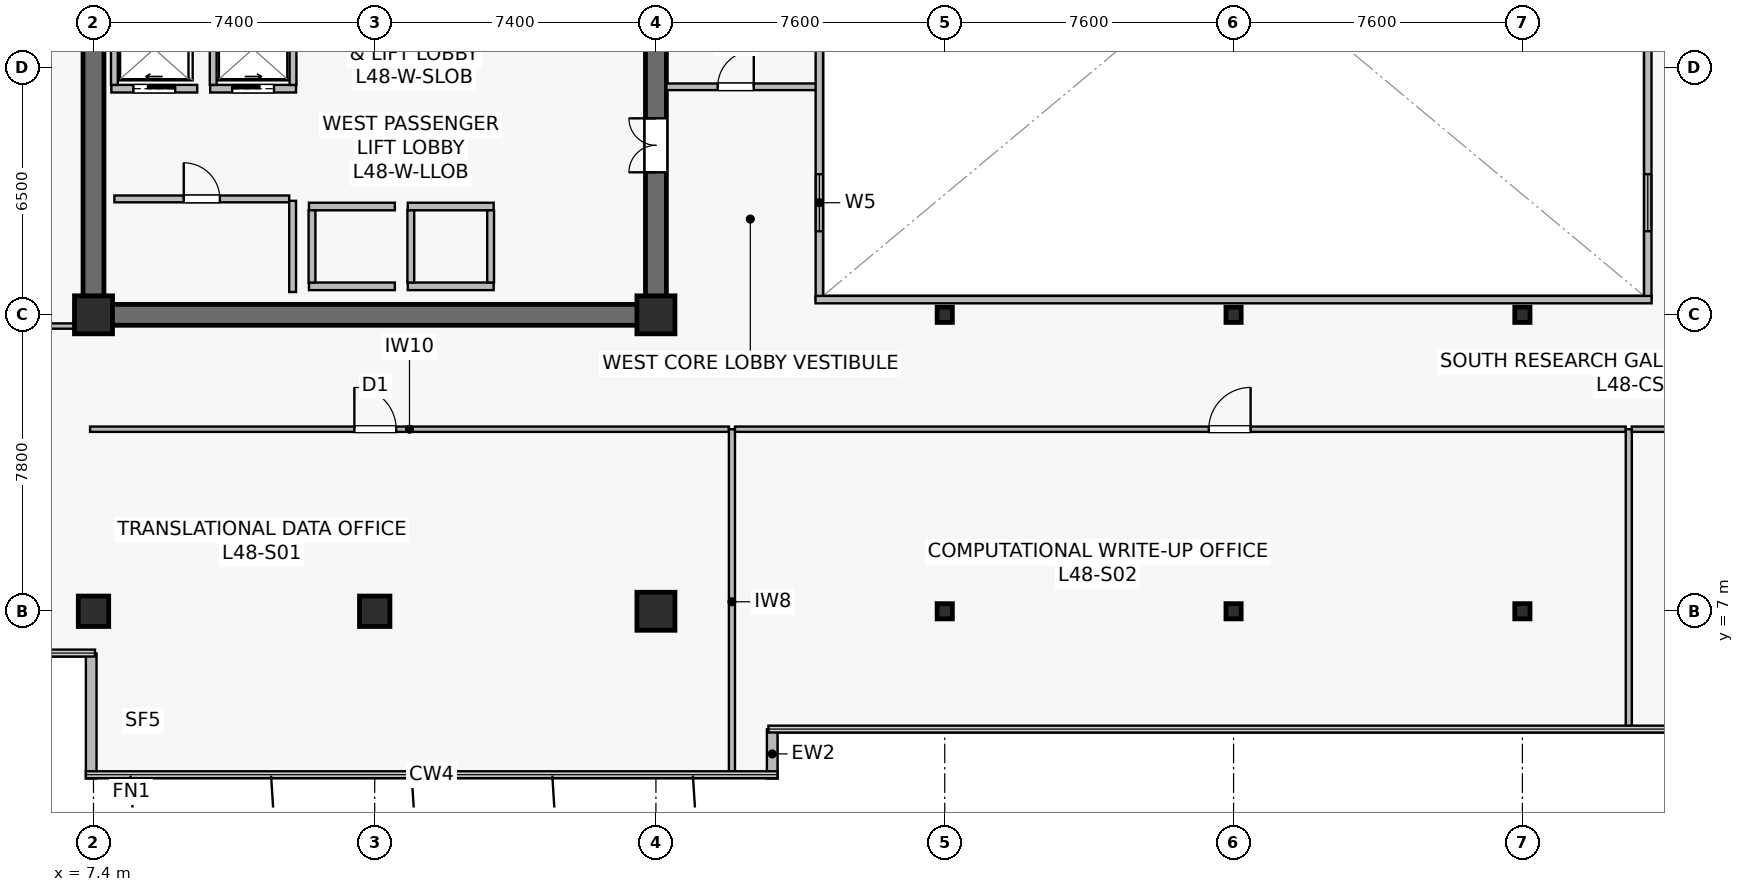
"""IFC4 building model, lengths in metres.
Left out: names, types, materials, properties, quantities, classifications, styles, units other than length and angle.
Written with IfcOpenShell. Run it as: python <this file> out.ifc"""

import sys

from ifc_helpers import new_model, si_unit, direction, frame, frame_2d, origin, origin_2d, place, context, subcontext, project, spatial, rectangle, hollow_rectangle, extrude, source, transform, mapped, element, fill, save


model = new_model("IFC4")
c1 = context("Model", 3, precision=1e-05, world=origin(), true_north=direction((0.0, 1.0)))
c2 = subcontext(c1, "Body", "Model", "MODEL_VIEW")
j1 = project(units=[si_unit("LENGTHUNIT", "METRE"), si_unit("PLANEANGLEUNIT", "RADIAN")], contexts=[c1])
p1 = place(None, origin())
s1 = spatial("IfcSite", under=j1, at=p1, CompositionType="ELEMENT")
p2 = place(p1, origin())
s2 = spatial("IfcBuilding", under=s1, at=p2, CompositionType="ELEMENT")
p3 = place(p2, frame((0.0, 0.0, 201.4)))
s3 = spatial("IfcBuildingStorey", under=s2, at=p3, CompositionType="ELEMENT", Elevation=201.4)
p4 = place(p3, frame((7.125, 14.8, 0.0), z_axis=(0.0, 0.0, 1.0), x_axis=(1.0, 0.0, 0.0)))
e1 = element("IfcWall", 1, at=p4, inside=s3, PredefinedType="SHEAR", context=c2, shape_type="SweptSolid", body=[
    extrude(rectangle(XDim=15.35, YDim=0.55, at=frame_2d((7.675, 0.0))), origin(), (0.0, 0.0, 1.0), 3.8),
])
p5 = place(p3, frame((7.4, 15.075, 0.0), z_axis=(0.0, 0.0, 1.0), x_axis=(0.0, 1.0, 0.0)))
e2 = element("IfcWall", 2, at=p5, inside=s3, PredefinedType="SHEAR", context=c2, shape_type="SweptSolid", body=[
    extrude(rectangle(XDim=18.45, YDim=0.55, at=frame_2d((9.225, 0.0))), origin(), (0.0, 0.0, 1.0), 3.8),
])
p6 = place(p3, frame((22.2, 15.075, 0.0), z_axis=(0.0, 0.0, 1.0), x_axis=(0.0, 1.0, 0.0)))
e3 = element("IfcWall", 3, at=p6, inside=s3, PredefinedType="SHEAR", context=c2, shape_type="SweptSolid", body=[
    extrude(rectangle(XDim=18.45, YDim=0.55, at=frame_2d((9.225, 0.0))), origin(), (0.0, 0.0, 1.0), 3.8),
])
p7 = place(p6, frame((3.475, 0.0, 0.0)))
e4 = element("IfcOpeningElement", 4, at=p7, cuts=e3, PredefinedType="OPENING", context=c2, shape_type="SweptSolid", body=[
    extrude(rectangle(XDim=1.42, YDim=2.2, at=frame_2d((0.71, 1.1))), frame((0.0, 0.285, 0.0), z_axis=(0.0, -1.0, 0.0), x_axis=(1.0, 0.0, 0.0)), (0.0, 0.0, 1.0), 0.57),
])
m1 = source(origin(), c2, "Body", "SweptSolid", [
    extrude(rectangle(XDim=0.8, YDim=0.8, at=origin_2d()), origin(), (0.0, 0.0, 1.0), 4.1),
])
p8 = place(p3, frame((14.8, 7.0, 0.0), z_axis=(0.0, 0.0, 1.0), x_axis=(1.0, 0.0, 0.0)))
e5 = element("IfcColumn", 5, at=p8, inside=s3, PredefinedType="COLUMN", context=c2, shape_type="MappedRepresentation", body=[
    mapped(m1, transform((0.0, 0.0, 0.0), scale=1.0)),
])
m2 = source(origin(), c2, "Body", "SweptSolid", [
    extrude(rectangle(XDim=1.0, YDim=1.0, at=origin_2d()), origin(), (0.0, 0.0, 1.0), 4.1),
])
for number, where, z_axis, x_axis in (
    (6, (22.2, 7.0, 0.0), (0.0, 0.0, 1.0), (1.0, 0.0, 0.0)),
    (7, (7.4, 14.8, 0.0), (0.0, 0.0, 1.0), (1.0, 0.0, 0.0)),
    (8, (22.2, 14.8, 0.0), (0.0, 0.0, 1.0), (1.0, 0.0, 0.0)),
):
    element("IfcColumn", number, at=place(p3, frame(where, z_axis=z_axis, x_axis=x_axis)), inside=s3, PredefinedType="COLUMN", context=c2, shape_type="MappedRepresentation", body=[
        mapped(m2, transform((0.0, 0.0, 0.0), scale=1.0)),
    ])
p9 = place(p3, frame((7.4, 7.0, 0.0), z_axis=(0.0, 0.0, 1.0), x_axis=(1.0, 0.0, 0.0)))
e9 = element("IfcColumn", 9, at=p9, inside=s3, PredefinedType="COLUMN", context=c2, shape_type="MappedRepresentation", body=[
    mapped(m1, transform((0.0, 0.0, 0.0), scale=1.0)),
])
m3 = source(origin(), c2, "Body", "SweptSolid", [
    extrude(hollow_rectangle(XDim=0.4, YDim=0.4, WallThickness=0.019, at=origin_2d()), origin(), (0.0, 0.0, 1.0), 4.1),
])
for number, where, z_axis, x_axis in (
    (10, (29.8, 7.0, 0.0), (0.0, 0.0, 1.0), (1.0, 0.0, 0.0)),
    (11, (29.8, 14.8, 0.0), (0.0, 0.0, 1.0), (1.0, 0.0, 0.0)),
    (12, (37.4, 7.0, 0.0), (0.0, 0.0, 1.0), (1.0, 0.0, 0.0)),
    (13, (37.4, 14.8, 0.0), (0.0, 0.0, 1.0), (1.0, 0.0, 0.0)),
    (14, (45.0, 7.0, 0.0), (0.0, 0.0, 1.0), (1.0, 0.0, 0.0)),
    (15, (45.0, 14.8, 0.0), (0.0, 0.0, 1.0), (1.0, 0.0, 0.0)),
):
    element("IfcColumn", number, at=place(p3, frame(where, z_axis=z_axis, x_axis=x_axis)), inside=s3, PredefinedType="COLUMN", context=c2, shape_type="MappedRepresentation", body=[
        mapped(m3, transform((0.0, 0.0, 0.0), scale=1.0)),
    ])
p10 = place(p3, frame((25.26, 2.6, 0.0), z_axis=(0.0, 0.0, 1.0), x_axis=(0.0, 1.0, 0.0)))
e16 = element("IfcWall", 16, at=p10, inside=s3, PredefinedType="STANDARD", context=c2, shape_type="SweptSolid", body=[
    extrude(rectangle(XDim=1.293, YDim=0.28, at=frame_2d((0.646, 0.0))), origin(), (0.0, 0.0, 1.0), 3.8),
])
p11 = place(p3, frame((7.34, 5.888, 0.0), z_axis=(0.0, 0.0, 1.0), x_axis=(0.0, -1.0, 0.0)))
e17 = element("IfcWall", 17, at=p11, inside=s3, PredefinedType="STANDARD", context=c2, shape_type="SweptSolid", body=[
    extrude(rectangle(XDim=3.288, YDim=0.28, at=frame_2d((1.644, 0.0))), origin(), (0.0, 0.0, 1.0), 3.8),
])
for number, where, z_axis, x_axis in (
    (18, (13.07, 17.65, 0.0), (0.0, 0.0, 1.0), (1.0, 0.0, 0.0)),
    (19, (13.07, 15.55, 0.0), (0.0, 0.0, 1.0), (1.0, 0.0, 0.0)),
):
    element("IfcWall", number, at=place(p3, frame(where, z_axis=z_axis, x_axis=x_axis)), inside=s3, PredefinedType="SOLIDWALL", context=c2, shape_type="SweptSolid", body=[
        extrude(rectangle(XDim=2.26, YDim=0.2, at=frame_2d((1.13, 0.0))), origin(), (0.0, 0.0, 1.0), 3.197),
    ])
p12 = place(p3, frame((13.15, 15.65, 0.0), z_axis=(0.0, 0.0, 1.0), x_axis=(0.0, 1.0, 0.0)))
e20 = element("IfcWall", 20, at=p12, inside=s3, PredefinedType="SOLIDWALL", context=c2, shape_type="SweptSolid", body=[
    extrude(rectangle(XDim=1.9, YDim=0.18, at=frame_2d((0.95, 0.0))), origin(), (0.0, 0.0, 1.0), 3.8),
])
for number, where, z_axis, x_axis in (
    (21, (15.67, 17.65, 0.0), (0.0, 0.0, 1.0), (1.0, 0.0, 0.0)),
    (22, (15.67, 15.55, 0.0), (0.0, 0.0, 1.0), (1.0, 0.0, 0.0)),
):
    element("IfcWall", number, at=place(p3, frame(where, z_axis=z_axis, x_axis=x_axis)), inside=s3, PredefinedType="SOLIDWALL", context=c2, shape_type="SweptSolid", body=[
        extrude(rectangle(XDim=2.26, YDim=0.2, at=frame_2d((1.13, 0.0))), origin(), (0.0, 0.0, 1.0), 3.8),
    ])
for number, where, z_axis, x_axis in (
    (23, (15.75, 15.65, 0.0), (0.0, 0.0, 1.0), (0.0, 1.0, 0.0)),
    (24, (17.85, 15.65, 0.0), (0.0, 0.0, 1.0), (0.0, 1.0, 0.0)),
):
    element("IfcWall", number, at=place(p3, frame(where, z_axis=z_axis, x_axis=x_axis)), inside=s3, PredefinedType="SOLIDWALL", context=c2, shape_type="SweptSolid", body=[
        extrude(rectangle(XDim=1.9, YDim=0.18, at=frame_2d((0.95, 0.0))), origin(), (0.0, 0.0, 1.0), 3.8),
    ])
p13 = place(p3, frame((7.87, 20.75, 0.0), z_axis=(0.0, 0.0, 1.0), x_axis=(1.0, 0.0, 0.0)))
e25 = element("IfcWall", 25, at=p13, inside=s3, PredefinedType="SOLIDWALL", context=c2, shape_type="SweptSolid", body=[
    extrude(rectangle(XDim=2.26, YDim=0.2, at=frame_2d((1.13, 0.0))), origin(), (0.0, 0.0, 1.0), 3.8),
])
p14 = place(p13, frame((0.58, 0.0, 0.0)))
e26 = element("IfcOpeningElement", 26, at=p14, cuts=e25, PredefinedType="OPENING", context=c2, shape_type="SweptSolid", body=[
    extrude(rectangle(XDim=1.1, YDim=2.22, at=frame_2d((0.55, 1.11))), frame((0.0, 0.11, 0.0), z_axis=(0.0, -1.0, 0.0), x_axis=(1.0, 0.0, 0.0)), (0.0, 0.0, 1.0), 0.22),
])
p15 = place(p3, frame((7.95, 20.85, 0.0), z_axis=(0.0, 0.0, 1.0), x_axis=(0.0, 1.0, 0.0)))
e27 = element("IfcWall", 27, at=p15, inside=s3, PredefinedType="SOLIDWALL", context=c2, shape_type="SweptSolid", body=[
    extrude(rectangle(XDim=1.9, YDim=0.18, at=frame_2d((0.95, 0.0))), origin(), (0.0, 0.0, 1.0), 3.8),
])
p16 = place(p3, frame((10.47, 20.75, 0.0), z_axis=(0.0, 0.0, 1.0), x_axis=(1.0, 0.0, 0.0)))
e28 = element("IfcWall", 28, at=p16, inside=s3, PredefinedType="SOLIDWALL", context=c2, shape_type="SweptSolid", body=[
    extrude(rectangle(XDim=2.26, YDim=0.2, at=frame_2d((1.13, 0.0))), origin(), (0.0, 0.0, 1.0), 3.8),
])
p17 = place(p16, frame((0.58, 0.0, 0.0)))
e29 = element("IfcOpeningElement", 29, at=p17, cuts=e28, PredefinedType="OPENING", context=c2, shape_type="SweptSolid", body=[
    extrude(rectangle(XDim=1.1, YDim=2.22, at=frame_2d((0.55, 1.11))), frame((0.0, 0.11, 0.0), z_axis=(0.0, -1.0, 0.0), x_axis=(1.0, 0.0, 0.0)), (0.0, 0.0, 1.0), 0.22),
])
for number, where, z_axis, x_axis in (
    (30, (10.55, 20.85, 0.0), (0.0, 0.0, 1.0), (0.0, 1.0, 0.0)),
    (31, (12.65, 20.85, 0.0), (0.0, 0.0, 1.0), (0.0, 1.0, 0.0)),
):
    element("IfcWall", number, at=place(p3, frame(where, z_axis=z_axis, x_axis=x_axis)), inside=s3, PredefinedType="SOLIDWALL", context=c2, shape_type="SweptSolid", body=[
        extrude(rectangle(XDim=1.9, YDim=0.18, at=frame_2d((0.95, 0.0))), origin(), (0.0, 0.0, 1.0), 3.8),
    ])
p18 = place(p3, frame((7.95, 17.85, 0.0), z_axis=(0.0, 0.0, 1.0), x_axis=(1.0, 0.0, 0.0)))
e32 = element("IfcWall", 32, at=p18, inside=s3, PredefinedType="SOLIDWALL", context=c2, shape_type="SweptSolid", body=[
    extrude(rectangle(XDim=4.6, YDim=0.18, at=frame_2d((2.3, 0.0))), origin(), (0.0, 0.0, 1.0), 3.8),
])
p19 = place(p18, frame((1.825, 0.0, 0.0)))
e33 = element("IfcOpeningElement", 33, at=p19, cuts=e32, PredefinedType="OPENING", context=c2, shape_type="SweptSolid", body=[
    extrude(rectangle(XDim=0.95, YDim=2.15, at=frame_2d((0.475, 1.075))), frame((0.0, 0.1, 0.0), z_axis=(0.0, -1.0, 0.0), x_axis=(1.0, 0.0, 0.0)), (0.0, 0.0, 1.0), 0.2),
])
p20 = place(p3, frame((12.64, 15.4, 0.0), z_axis=(0.0, 0.0, 1.0), x_axis=(0.0, 1.0, 0.0)))
e34 = element("IfcWall", 34, at=p20, inside=s3, PredefinedType="SOLIDWALL", context=c2, shape_type="SweptSolid", body=[
    extrude(rectangle(XDim=2.4, YDim=0.18, at=frame_2d((1.2, 0.0))), origin(), (0.0, 0.0, 1.0), 3.8),
])
p21 = place(p3, frame((22.475, 20.8, 0.0), z_axis=(0.0, 0.0, 1.0), x_axis=(1.0, 0.0, 0.0)))
e35 = element("IfcWall", 35, at=p21, inside=s3, PredefinedType="PARTITIONING", context=c2, shape_type="SweptSolid", body=[
    extrude(rectangle(XDim=4.025, YDim=0.175, at=frame_2d((2.012, 0.0))), origin(), (0.0, 0.0, 1.0), 3.8),
])
p22 = place(p21, frame((1.35, 0.0, 0.0)))
e36 = element("IfcOpeningElement", 36, at=p22, cuts=e35, PredefinedType="OPENING", context=c2, shape_type="SweptSolid", body=[
    extrude(rectangle(XDim=0.95, YDim=2.15, at=frame_2d((0.475, 1.075))), frame((0.0, 0.098, 0.0), z_axis=(0.0, -1.0, 0.0), x_axis=(1.0, 0.0, 0.0)), (0.0, 0.0, 1.0), 0.195),
])
p23 = place(p3, frame((26.5, 15.2, 0.0), z_axis=(0.0, 0.0, 1.0), x_axis=(0.0, 1.0, 0.0)))
e37 = element("IfcWall", 37, at=p23, inside=s3, PredefinedType="SOLIDWALL", context=c2, shape_type="SweptSolid", body=[
    extrude(rectangle(XDim=18.2, YDim=0.195, at=frame_2d((9.1, 0.0))), origin(), (0.0, 0.0, 1.0), 3.8),
])
p24 = place(p23, frame((1.8, 0.0, 0.9)))
e38 = element("IfcOpeningElement", 38, at=p24, cuts=e37, PredefinedType="OPENING", context=c2, shape_type="SweptSolid", body=[
    extrude(rectangle(XDim=1.5, YDim=1.4, at=frame_2d((0.75, 0.7))), frame((0.0, 0.107, 0.0), z_axis=(0.0, -1.0, 0.0), x_axis=(1.0, 0.0, 0.0)), (0.0, 0.0, 1.0), 0.215),
])
p25 = place(p23, frame((13.2, 0.0, 0.9)))
e39 = element("IfcOpeningElement", 39, at=p25, cuts=e37, PredefinedType="OPENING", context=c2, shape_type="SweptSolid", body=[
    extrude(rectangle(XDim=1.5, YDim=1.4, at=frame_2d((0.75, 0.7))), frame((0.0, 0.107, 0.0), z_axis=(0.0, -1.0, 0.0), x_axis=(1.0, 0.0, 0.0)), (0.0, 0.0, 1.0), 0.215),
])
p26 = place(p3, frame((48.3, 15.2, 0.0), z_axis=(0.0, 0.0, 1.0), x_axis=(0.0, 1.0, 0.0)))
e40 = element("IfcWall", 40, at=p26, inside=s3, PredefinedType="SOLIDWALL", context=c2, shape_type="SweptSolid", body=[
    extrude(rectangle(XDim=18.2, YDim=0.195, at=frame_2d((9.1, 0.0))), origin(), (0.0, 0.0, 1.0), 3.8),
])
p27 = place(p26, frame((1.8, 0.0, 0.9)))
e41 = element("IfcOpeningElement", 41, at=p27, cuts=e40, PredefinedType="OPENING", context=c2, shape_type="SweptSolid", body=[
    extrude(rectangle(XDim=1.5, YDim=1.4, at=frame_2d((0.75, 0.7))), frame((0.0, 0.107, 0.0), z_axis=(0.0, -1.0, 0.0), x_axis=(1.0, 0.0, 0.0)), (0.0, 0.0, 1.0), 0.215),
])
p28 = place(p26, frame((13.2, 0.0, 0.9)))
e42 = element("IfcOpeningElement", 42, at=p28, cuts=e40, PredefinedType="OPENING", context=c2, shape_type="SweptSolid", body=[
    extrude(rectangle(XDim=1.5, YDim=1.4, at=frame_2d((0.75, 0.7))), frame((0.0, 0.107, 0.0), z_axis=(0.0, -1.0, 0.0), x_axis=(1.0, 0.0, 0.0)), (0.0, 0.0, 1.0), 0.215),
])
p29 = place(p3, frame((26.4, 15.2, 0.0), z_axis=(0.0, 0.0, 1.0), x_axis=(1.0, 0.0, 0.0)))
e43 = element("IfcWall", 43, at=p29, inside=s3, PredefinedType="SOLIDWALL", context=c2, shape_type="SweptSolid", body=[
    extrude(rectangle(XDim=22.0, YDim=0.195, at=frame_2d((11.0, 0.0))), origin(), (0.0, 0.0, 1.0), 3.8),
])
p30 = place(p3, frame((7.31, 11.79, 0.0), z_axis=(0.0, 0.0, 1.0), x_axis=(1.0, 0.0, 0.0)))
e44 = element("IfcWall", 44, at=p30, inside=s3, PredefinedType="PARTITIONING", context=c2, shape_type="SweptSolid", body=[
    extrude(rectangle(XDim=16.81, YDim=0.14, at=frame_2d((8.405, 0.0))), origin(), (0.0, 0.0, 1.0), 3.197),
])
p31 = place(p30, frame((6.954, 0.0, 0.0)))
e45 = element("IfcOpeningElement", 45, at=p31, cuts=e44, PredefinedType="OPENING", context=c2, shape_type="SweptSolid", body=[
    extrude(rectangle(XDim=1.1, YDim=2.18, at=frame_2d((0.55, 1.09))), frame((0.0, 0.08, 0.0), z_axis=(0.0, -1.0, 0.0), x_axis=(1.0, 0.0, 0.0)), (0.0, 0.0, 1.0), 0.16),
])
p32 = place(p3, frame((24.2, 2.71, 0.0), z_axis=(0.0, 0.0, 1.0), x_axis=(0.0, 1.0, 0.0)))
e46 = element("IfcWall", 46, at=p32, inside=s3, PredefinedType="PARTITIONING", context=c2, shape_type="SweptSolid", body=[
    extrude(rectangle(XDim=9.08, YDim=0.16, at=frame_2d((4.54, 0.0))), origin(), (0.0, 0.0, 1.0), 3.135),
])
p33 = place(p3, frame((24.28, 11.79, 0.0), z_axis=(0.0, 0.0, 1.0), x_axis=(1.0, 0.0, 0.0)))
e47 = element("IfcWall", 47, at=p33, inside=s3, PredefinedType="PARTITIONING", context=c2, shape_type="SweptSolid", body=[
    extrude(rectangle(XDim=23.44, YDim=0.14, at=frame_2d((11.72, 0.0))), origin(), (0.0, 0.0, 1.0), 3.197),
])
p34 = place(p33, frame((12.469, 0.0, 0.0)))
e48 = element("IfcOpeningElement", 48, at=p34, cuts=e47, PredefinedType="OPENING", context=c2, shape_type="SweptSolid", body=[
    extrude(rectangle(XDim=1.1, YDim=2.18, at=frame_2d((0.55, 1.09))), frame((0.0, 0.08, 0.0), z_axis=(0.0, -1.0, 0.0), x_axis=(1.0, 0.0, 0.0)), (0.0, 0.0, 1.0), 0.16),
])
p35 = place(p3, frame((47.8, 3.91, 0.0), z_axis=(0.0, 0.0, 1.0), x_axis=(0.0, 1.0, 0.0)))
e49 = element("IfcWall", 49, at=p35, inside=s3, PredefinedType="PARTITIONING", context=c2, shape_type="SweptSolid", body=[
    extrude(rectangle(XDim=7.88, YDim=0.16, at=frame_2d((3.94, 0.0))), origin(), (0.0, 0.0, 1.0), 3.135),
])
p36 = place(p3, frame((47.88, 11.79, 0.0), z_axis=(0.0, 0.0, 1.0), x_axis=(1.0, 0.0, 0.0)))
e50 = element("IfcWall", 50, at=p36, inside=s3, PredefinedType="PARTITIONING", context=c2, shape_type="SweptSolid", body=[
    extrude(rectangle(XDim=19.61, YDim=0.14, at=frame_2d((9.805, 0.0))), origin(), (0.0, 0.0, 1.0), 3.197),
])
p37 = place(p36, frame((8.186, 0.0, 0.0)))
e51 = element("IfcOpeningElement", 51, at=p37, cuts=e50, PredefinedType="OPENING", context=c2, shape_type="SweptSolid", body=[
    extrude(rectangle(XDim=1.1, YDim=2.18, at=frame_2d((0.55, 1.09))), frame((0.0, 0.08, 0.0), z_axis=(0.0, -1.0, 0.0), x_axis=(1.0, 0.0, 0.0)), (0.0, 0.0, 1.0), 0.16),
])
p38 = place(p3, frame((4.11, 14.505, 0.0), z_axis=(0.0, 0.0, 1.0), x_axis=(1.0, 0.0, 0.0)))
e52 = element("IfcWall", 52, at=p38, inside=s3, PredefinedType="PARTITIONING", context=c2, shape_type="SweptSolid", body=[
    extrude(rectangle(XDim=2.91, YDim=0.14, at=frame_2d((1.455, 0.0))), origin(), (0.0, 0.0, 1.0), 3.8),
])
p39 = place(p38, frame((1.005, 0.0, 0.0)))
e53 = element("IfcOpeningElement", 53, at=p39, cuts=e52, PredefinedType="OPENING", context=c2, shape_type="SweptSolid", body=[
    extrude(rectangle(XDim=0.9, YDim=2.1, at=frame_2d((0.45, 1.05))), frame((0.0, 0.08, 0.0), z_axis=(0.0, -1.0, 0.0), x_axis=(1.0, 0.0, 0.0)), (0.0, 0.0, 1.0), 0.16),
])
m4 = source(origin(), c2, "Body", "SweptSolid", [
    extrude(rectangle(XDim=1.5, YDim=1.4, at=frame_2d((0.75, 0.7))), frame((0.0, 0.03, 0.0), z_axis=(0.0, -1.0, 0.0), x_axis=(1.0, 0.0, 0.0)), (0.0, 0.0, 1.0), 0.06),
])
p40 = place(p24, origin())
e54 = element("IfcWindow", 54, at=p40, inside=s3, PartitioningType="SINGLE_PANEL", PredefinedType="WINDOW", context=c2, shape_type="MappedRepresentation", body=[
    mapped(m4, transform((0.0, 0.0, 0.0), scale=1.0)),
])
fill(e38, e54)
p41 = place(p27, origin())
e55 = element("IfcWindow", 55, at=p41, inside=s3, PartitioningType="SINGLE_PANEL", PredefinedType="WINDOW", context=c2, shape_type="MappedRepresentation", body=[
    mapped(m4, transform((0.0, 0.0, 0.0), scale=1.0)),
])
fill(e41, e55)
m5 = source(origin(), c2, "Body", "SweptSolid", [
    extrude(rectangle(XDim=1.1, YDim=2.22, at=frame_2d((0.55, 1.11))), frame((0.0, 0.025, 0.0), z_axis=(0.0, -1.0, 0.0), x_axis=(1.0, 0.0, 0.0)), (0.0, 0.0, 1.0), 0.05),
])
p42 = place(p14, origin())
e56 = element("IfcDoor", 56, at=p42, inside=s3, OperationType="SLIDING_TO_LEFT", PredefinedType="USERDEFINED", context=c2, shape_type="MappedRepresentation", body=[
    mapped(m5, transform((0.0, 0.0, 0.0), scale=1.0)),
])
fill(e26, e56)
p43 = place(p17, origin())
e57 = element("IfcDoor", 57, at=p43, inside=s3, OperationType="SLIDING_TO_RIGHT", PredefinedType="USERDEFINED", context=c2, shape_type="MappedRepresentation", body=[
    mapped(m5, transform((0.0, 0.0, 0.0), scale=1.0)),
])
fill(e29, e57)
m6 = source(origin(), c2, "Body", "SweptSolid", [
    extrude(rectangle(XDim=0.95, YDim=2.15, at=frame_2d((0.475, 1.075))), frame((0.0, 0.025, 0.0), z_axis=(0.0, -1.0, 0.0), x_axis=(1.0, 0.0, 0.0)), (0.0, 0.0, 1.0), 0.05),
])
p44 = place(p19, origin())
e58 = element("IfcDoor", 58, at=p44, inside=s3, OperationType="SINGLE_SWING_LEFT", PredefinedType="DOOR", context=c2, shape_type="MappedRepresentation", body=[
    mapped(m6, transform((0.0, 0.0, 0.0), scale=1.0)),
])
fill(e33, e58)
m7 = source(origin(), c2, "Body", "SweptSolid", [
    extrude(rectangle(XDim=1.42, YDim=2.2, at=frame_2d((0.71, 1.1))), frame((0.0, 0.025, 0.0), z_axis=(0.0, -1.0, 0.0), x_axis=(1.0, 0.0, 0.0)), (0.0, 0.0, 1.0), 0.05),
])
p45 = place(p7, origin())
e59 = element("IfcDoor", 59, at=p45, inside=s3, OperationType="DOUBLE_DOOR_SINGLE_SWING", PredefinedType="DOOR", context=c2, shape_type="MappedRepresentation", body=[
    mapped(m7, transform((0.0, 0.0, 0.0), scale=1.0)),
])
fill(e4, e59)
p46 = place(p22, origin())
e60 = element("IfcDoor", 60, at=p46, inside=s3, OperationType="SINGLE_SWING_RIGHT", PredefinedType="DOOR", context=c2, shape_type="MappedRepresentation", body=[
    mapped(m6, transform((0.0, 0.0, 0.0), scale=1.0)),
])
fill(e36, e60)
m8 = source(origin(), c2, "Body", "SweptSolid", [
    extrude(rectangle(XDim=1.1, YDim=2.18, at=frame_2d((0.55, 1.09))), frame((0.0, 0.025, 0.0), z_axis=(0.0, -1.0, 0.0), x_axis=(1.0, 0.0, 0.0)), (0.0, 0.0, 1.0), 0.05),
])
p47 = place(p31, origin())
e61 = element("IfcDoor", 61, at=p47, inside=s3, OperationType="SINGLE_SWING_LEFT", PredefinedType="DOOR", context=c2, shape_type="MappedRepresentation", body=[
    mapped(m8, transform((0.0, 0.0, 0.0), scale=1.0)),
])
fill(e45, e61)
p48 = place(p34, origin())
e62 = element("IfcDoor", 62, at=p48, inside=s3, OperationType="SINGLE_SWING_RIGHT", PredefinedType="DOOR", context=c2, shape_type="MappedRepresentation", body=[
    mapped(m8, transform((0.0, 0.0, 0.0), scale=1.0)),
])
fill(e48, e62)
save(model, sys.argv[1])
